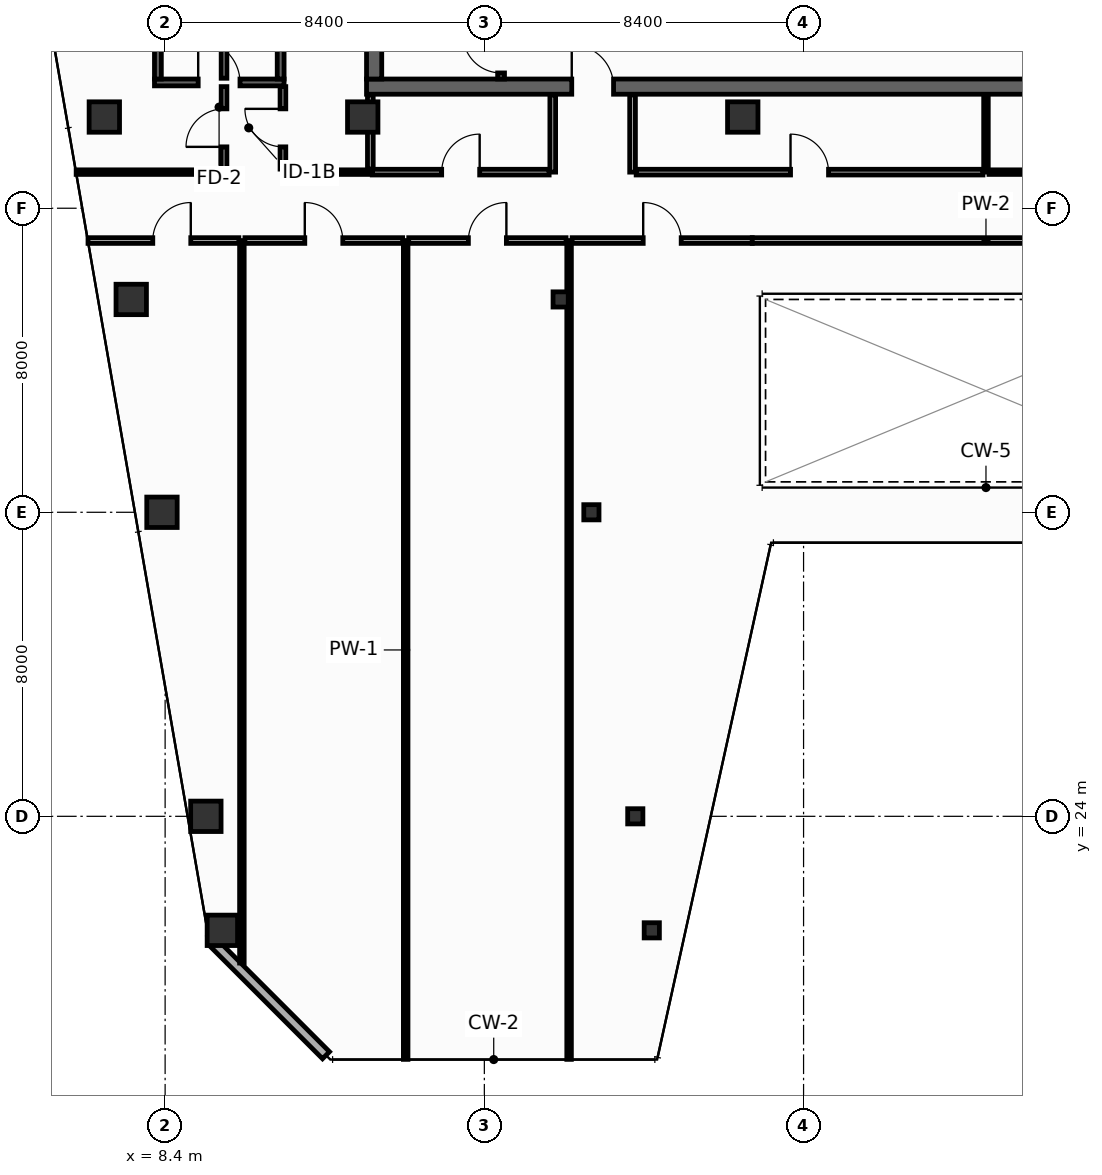
"""IFC4 building model, lengths in metres.
Left out: names, types, materials, properties, quantities, classifications, styles, units other than length and angle.
Written with IfcOpenShell. Run it as: python <this file> out.ifc"""

import sys

from ifc_helpers import new_model, si_unit, direction, frame, frame_2d, origin, origin_2d, place, context, subcontext, project, spatial, rectangle, hollow_rectangle, extrude, element, fill, save


model = new_model("IFC4")
c1 = context("Model", 3, precision=1e-05, world=origin(), true_north=direction((0.0, 1.0)))
c2 = subcontext(c1, "Body", "Model", "MODEL_VIEW")
j1 = project(units=[si_unit("LENGTHUNIT", "METRE"), si_unit("PLANEANGLEUNIT", "RADIAN")], contexts=[c1])
p1 = place(None, origin())
s1 = spatial("IfcSite", under=j1, at=p1, CompositionType="ELEMENT")
p2 = place(p1, origin())
s2 = spatial("IfcBuilding", under=s1, at=p2, CompositionType="ELEMENT")
p3 = place(p2, frame((0.0, 0.0, 234.4)))
s3 = spatial("IfcBuildingStorey", under=s2, at=p3, CompositionType="ELEMENT", Elevation=234.4)
p4 = place(p3, frame((13.7, 43.2, 0.0), z_axis=(0.0, 0.0, 1.0), x_axis=(1.0, 0.0, 0.0)))
e1 = element("IfcWall", 1, at=p4, inside=s3, PredefinedType="SHEAR", context=c2, shape_type="SweptSolid", body=[
    extrude(rectangle(XDim=32.5, YDim=0.4, at=frame_2d((16.25, 0.0))), origin(), (0.0, 0.0, 1.0), 3.55),
])
p5 = place(p4, frame((5.4, 0.0, 0.0)))
e2 = element("IfcOpeningElement", 2, at=p5, cuts=e1, PredefinedType="OPENING", context=c2, shape_type="SweptSolid", body=[
    extrude(rectangle(XDim=1.1, YDim=2.15, at=frame_2d((0.55, 1.075))), frame((0.0, 0.21, 0.0), z_axis=(0.0, -1.0, 0.0), x_axis=(1.0, 0.0, 0.0)), (0.0, 0.0, 1.0), 0.42),
])
p6 = place(p4, frame((25.6, 0.0, 0.0)))
e3 = element("IfcOpeningElement", 3, at=p6, cuts=e1, PredefinedType="OPENING", context=c2, shape_type="SweptSolid", body=[
    extrude(rectangle(XDim=1.1, YDim=2.15, at=frame_2d((0.55, 1.075))), frame((0.0, 0.21, 0.0), z_axis=(0.0, -1.0, 0.0), x_axis=(1.0, 0.0, 0.0)), (0.0, 0.0, 1.0), 0.42),
])
p7 = place(p3, frame((13.9, 43.4, 0.0), z_axis=(0.0, 0.0, 1.0), x_axis=(0.0, 1.0, 0.0)))
e4 = element("IfcWall", 4, at=p7, inside=s3, PredefinedType="SHEAR", context=c2, shape_type="SweptSolid", body=[
    extrude(rectangle(XDim=10.4, YDim=0.4, at=frame_2d((5.2, 0.0))), origin(), (0.0, 0.0, 1.0), 3.55),
])
for number, where, z_axis, x_axis in (
    (5, (6.8, 42.4, 0.0), (0.0, 0.0, 1.0), (1.0, 0.0, 0.0)),
    (6, (13.6, 42.4, 0.0), (0.0, 0.0, 1.0), (1.0, 0.0, 0.0)),
    (7, (23.6, 42.4, 0.0), (0.0, 0.0, 1.0), (1.0, 0.0, 0.0)),
    (8, (9.906, 21.0, 0.0), (0.0, 0.0, 1.0), (1.0, 0.0, 0.0)),
):
    element("IfcColumn", number, at=place(p3, frame(where, z_axis=z_axis, x_axis=x_axis)), inside=s3, PredefinedType="COLUMN", context=c2, shape_type="SweptSolid", body=[
        extrude(hollow_rectangle(XDim=0.8, YDim=0.8, WallThickness=0.036, at=origin_2d()), origin(), (0.0, 0.0, 1.0), 3.8),
    ])
p8 = place(p3, frame((21.206, 21.0, 0.0), z_axis=(0.0, 0.0, 1.0), x_axis=(1.0, 0.0, 0.0)))
e9 = element("IfcColumn", 9, at=p8, inside=s3, PredefinedType="COLUMN", context=c2, shape_type="SweptSolid", body=[
    extrude(hollow_rectangle(XDim=0.4, YDim=0.4, WallThickness=0.016, at=origin_2d()), origin(), (0.0, 0.0, 1.0), 3.8),
])
p9 = place(p3, frame((9.472, 24.0, 0.0), z_axis=(0.0, 0.0, 1.0), x_axis=(1.0, 0.0, 0.0)))
e10 = element("IfcColumn", 10, at=p9, inside=s3, PredefinedType="COLUMN", context=c2, shape_type="SweptSolid", body=[
    extrude(hollow_rectangle(XDim=0.8, YDim=0.8, WallThickness=0.036, at=origin_2d()), origin(), (0.0, 0.0, 1.0), 3.8),
])
p10 = place(p3, frame((20.772, 24.0, 0.0), z_axis=(0.0, 0.0, 1.0), x_axis=(1.0, 0.0, 0.0)))
e11 = element("IfcColumn", 11, at=p10, inside=s3, PredefinedType="COLUMN", context=c2, shape_type="SweptSolid", body=[
    extrude(hollow_rectangle(XDim=0.4, YDim=0.4, WallThickness=0.016, at=origin_2d()), origin(), (0.0, 0.0, 1.0), 3.8),
])
p11 = place(p3, frame((8.317, 32.0, 0.0), z_axis=(0.0, 0.0, 1.0), x_axis=(1.0, 0.0, 0.0)))
e12 = element("IfcColumn", 12, at=p11, inside=s3, PredefinedType="COLUMN", context=c2, shape_type="SweptSolid", body=[
    extrude(hollow_rectangle(XDim=0.8, YDim=0.8, WallThickness=0.036, at=origin_2d()), origin(), (0.0, 0.0, 1.0), 3.8),
])
p12 = place(p3, frame((19.617, 32.0, 0.0), z_axis=(0.0, 0.0, 1.0), x_axis=(1.0, 0.0, 0.0)))
e13 = element("IfcColumn", 13, at=p12, inside=s3, PredefinedType="COLUMN", context=c2, shape_type="SweptSolid", body=[
    extrude(hollow_rectangle(XDim=0.4, YDim=0.4, WallThickness=0.016, at=origin_2d()), origin(), (0.0, 0.0, 1.0), 3.8),
])
p13 = place(p3, frame((7.508, 37.6, 0.0), z_axis=(0.0, 0.0, 1.0), x_axis=(1.0, 0.0, 0.0)))
e14 = element("IfcColumn", 14, at=p13, inside=s3, PredefinedType="COLUMN", context=c2, shape_type="SweptSolid", body=[
    extrude(hollow_rectangle(XDim=0.8, YDim=0.8, WallThickness=0.036, at=origin_2d()), origin(), (0.0, 0.0, 1.0), 3.8),
])
p14 = place(p3, frame((18.808, 37.6, 0.0), z_axis=(0.0, 0.0, 1.0), x_axis=(1.0, 0.0, 0.0)))
e15 = element("IfcColumn", 15, at=p14, inside=s3, PredefinedType="COLUMN", context=c2, shape_type="SweptSolid", body=[
    extrude(hollow_rectangle(XDim=0.4, YDim=0.4, WallThickness=0.016, at=origin_2d()), origin(), (0.0, 0.0, 1.0), 3.8),
])
p15 = place(p3, frame((17.24, 43.4, 0.0), z_axis=(0.0, 0.0, 1.0), x_axis=(0.0, 1.0, 0.0)))
e16 = element("IfcWall", 16, at=p15, inside=s3, PredefinedType="SHEAR", context=c2, shape_type="SweptSolid", body=[
    extrude(rectangle(XDim=10.4, YDim=0.18, at=frame_2d((5.2, 0.0))), origin(), (0.0, 0.0, 1.0), 3.55),
])
p16 = place(p15, frame((0.16, 0.0, 0.0)))
e17 = element("IfcOpeningElement", 17, at=p16, cuts=e16, PredefinedType="OPENING", context=c2, shape_type="SweptSolid", body=[
    extrude(rectangle(XDim=1.0, YDim=2.15, at=frame_2d((0.5, 1.075))), frame((0.0, 0.1, 0.0), z_axis=(0.0, -1.0, 0.0), x_axis=(1.0, 0.0, 0.0)), (0.0, 0.0, 1.0), 0.2),
])
p17 = place(p3, frame((8.12, 43.31, 0.0), z_axis=(0.0, 0.0, 1.0), x_axis=(1.0, 0.0, 0.0)))
e18 = element("IfcWall", 18, at=p17, inside=s3, PredefinedType="SHEAR", context=c2, shape_type="SweptSolid", body=[
    extrude(rectangle(XDim=3.41, YDim=0.18, at=frame_2d((1.705, 0.0))), origin(), (0.0, 0.0, 1.0), 3.55),
])
p18 = place(p17, frame((1.15, 0.0, 0.0)))
e19 = element("IfcOpeningElement", 19, at=p18, cuts=e18, PredefinedType="OPENING", context=c2, shape_type="SweptSolid", body=[
    extrude(rectangle(XDim=1.1, YDim=2.15, at=frame_2d((0.55, 1.075))), frame((0.0, 0.1, 0.0), z_axis=(0.0, -1.0, 0.0), x_axis=(1.0, 0.0, 0.0)), (0.0, 0.0, 1.0), 0.2),
])
for number, where, z_axis, x_axis in (
    (20, (11.44, 43.4, 0.0), (0.0, 0.0, 1.0), (0.0, 1.0, 0.0)),
    (21, (8.21, 53.8, 0.0), (0.0, 0.0, 1.0), (0.0, -1.0, 0.0)),
):
    element("IfcWall", number, at=place(p3, frame(where, z_axis=z_axis, x_axis=x_axis)), inside=s3, PredefinedType="SHEAR", context=c2, shape_type="SweptSolid", body=[
        extrude(rectangle(XDim=10.4, YDim=0.18, at=frame_2d((5.2, 0.0))), origin(), (0.0, 0.0, 1.0), 3.55),
    ])
p19 = place(p3, frame((9.66, 20.687, 0.0), z_axis=(0.0, 0.0, 1.0), x_axis=(0.70707775441, -0.707135806771, 0.0)))
e22 = element("IfcWall", 22, at=p19, inside=s3, PredefinedType="STANDARD", context=c2, shape_type="SweptSolid", body=[
    extrude(rectangle(XDim=4.206, YDim=0.26, at=frame_2d((2.103, 0.0))), origin(), (0.0, 0.0, 1.0), 3.55),
])
p20 = place(p3, frame((6.059, 40.95, 0.0), z_axis=(0.0, 0.0, 1.0), x_axis=(1.0, 0.0, 0.0)))
e23 = element("IfcWall", 23, at=p20, inside=s3, PredefinedType="PARTITIONING", context=c2, shape_type="SweptSolid", body=[
    extrude(rectangle(XDim=3.891, YDim=0.12, at=frame_2d((1.945, 0.0))), origin(), (0.0, 0.0, 1.0), 3.085),
])
p21 = place(p3, frame((11.5, 40.95, 0.0), z_axis=(0.0, 0.0, 1.0), x_axis=(1.0, 0.0, 0.0)))
e24 = element("IfcWall", 24, at=p21, inside=s3, PredefinedType="PARTITIONING", context=c2, shape_type="SweptSolid", body=[
    extrude(rectangle(XDim=2.35, YDim=0.12, at=frame_2d((1.175, 0.0))), origin(), (0.0, 0.0, 1.0), 3.55),
])
p22 = place(p3, frame((9.95, 41.03, 0.0), z_axis=(0.0, 0.0, 1.0), x_axis=(0.0, 1.0, 0.0)))
e25 = element("IfcWall", 25, at=p22, inside=s3, PredefinedType="PARTITIONING", context=c2, shape_type="SweptSolid", body=[
    extrude(rectangle(XDim=2.17, YDim=0.15, at=frame_2d((1.085, 0.0))), origin(), (0.0, 0.0, 1.0), 2.947),
])
p23 = place(p22, frame((0.585, 0.0, 0.0)))
e26 = element("IfcOpeningElement", 26, at=p23, cuts=e25, PredefinedType="OPENING", context=c2, shape_type="SweptSolid", body=[
    extrude(rectangle(XDim=1.0, YDim=2.15, at=frame_2d((0.5, 1.075))), frame((0.0, 0.085, 0.0), z_axis=(0.0, -1.0, 0.0), x_axis=(1.0, 0.0, 0.0)), (0.0, 0.0, 1.0), 0.17),
])
p24 = place(p3, frame((9.95, 43.42, 0.0), z_axis=(0.0, 0.0, 1.0), x_axis=(0.0, 1.0, 0.0)))
e27 = element("IfcWall", 27, at=p24, inside=s3, PredefinedType="PARTITIONING", context=c2, shape_type="SweptSolid", body=[
    extrude(rectangle(XDim=1.45, YDim=0.15, at=frame_2d((0.725, 0.0))), origin(), (0.0, 0.0, 1.0), 3.55),
])
p25 = place(p3, frame((11.5, 41.03, 0.0), z_axis=(0.0, 0.0, 1.0), x_axis=(0.0, 1.0, 0.0)))
e28 = element("IfcWall", 28, at=p25, inside=s3, PredefinedType="PARTITIONING", context=c2, shape_type="SweptSolid", body=[
    extrude(rectangle(XDim=2.17, YDim=0.15, at=frame_2d((1.085, 0.0))), origin(), (0.0, 0.0, 1.0), 2.947),
])
p26 = place(p25, frame((0.585, 0.0, 0.0)))
e29 = element("IfcOpeningElement", 29, at=p26, cuts=e28, PredefinedType="OPENING", context=c2, shape_type="SweptSolid", body=[
    extrude(rectangle(XDim=1.0, YDim=2.15, at=frame_2d((0.5, 1.075))), frame((0.0, 0.085, 0.0), z_axis=(0.0, -1.0, 0.0), x_axis=(1.0, 0.0, 0.0)), (0.0, 0.0, 1.0), 0.17),
])
p27 = place(p3, frame((13.8, 41.03, 0.0), z_axis=(0.0, 0.0, 1.0), x_axis=(0.0, 1.0, 0.0)))
e30 = element("IfcWall", 30, at=p27, inside=s3, PredefinedType="PARTITIONING", context=c2, shape_type="SweptSolid", body=[
    extrude(rectangle(XDim=1.95, YDim=0.15, at=frame_2d((0.975, 0.0))), origin(), (0.0, 0.0, 1.0), 3.55),
])
for number, where, z_axis, x_axis in (
    (31, (18.6, 40.95, 0.0), (0.0, 0.0, 1.0), (0.0, 1.0, 0.0)),
    (32, (20.7, 40.95, 0.0), (0.0, 0.0, 1.0), (0.0, 1.0, 0.0)),
):
    element("IfcWall", number, at=place(p3, frame(where, z_axis=z_axis, x_axis=x_axis)), inside=s3, PredefinedType="PARTITIONING", context=c2, shape_type="SweptSolid", body=[
        extrude(rectangle(XDim=2.03, YDim=0.15, at=frame_2d((1.015, 0.0))), origin(), (0.0, 0.0, 1.0), 3.55),
    ])
p28 = place(p3, frame((13.85, 40.95, 0.0), z_axis=(0.0, 0.0, 1.0), x_axis=(1.0, 0.0, 0.0)))
e33 = element("IfcWall", 33, at=p28, inside=s3, PredefinedType="PARTITIONING", context=c2, shape_type="SweptSolid", body=[
    extrude(rectangle(XDim=4.655, YDim=0.15, at=frame_2d((2.327, 0.0))), origin(), (0.0, 0.0, 1.0), 3.55),
])
p29 = place(p28, frame((1.827, 0.0, 0.0)))
e34 = element("IfcOpeningElement", 34, at=p29, cuts=e33, PredefinedType="OPENING", context=c2, shape_type="SweptSolid", body=[
    extrude(rectangle(XDim=1.0, YDim=2.15, at=frame_2d((0.5, 1.075))), frame((0.0, 0.085, 0.0), z_axis=(0.0, -1.0, 0.0), x_axis=(1.0, 0.0, 0.0)), (0.0, 0.0, 1.0), 0.17),
])
p30 = place(p3, frame((30.0, 40.95, 0.0), z_axis=(0.0, 0.0, 1.0), x_axis=(0.0, 1.0, 0.0)))
e35 = element("IfcWall", 35, at=p30, inside=s3, PredefinedType="PARTITIONING", context=c2, shape_type="SweptSolid", body=[
    extrude(rectangle(XDim=2.03, YDim=0.12, at=frame_2d((1.015, 0.0))), origin(), (0.0, 0.0, 1.0), 2.947),
])
p31 = place(p3, frame((20.795, 40.95, 0.0), z_axis=(0.0, 0.0, 1.0), x_axis=(1.0, 0.0, 0.0)))
e36 = element("IfcWall", 36, at=p31, inside=s3, PredefinedType="PARTITIONING", context=c2, shape_type="SweptSolid", body=[
    extrude(rectangle(XDim=9.125, YDim=0.15, at=frame_2d((4.562, 0.0))), origin(), (0.0, 0.0, 1.0), 2.947),
])
p32 = place(p31, frame((4.062, 0.0, 0.0)))
e37 = element("IfcOpeningElement", 37, at=p32, cuts=e36, PredefinedType="OPENING", context=c2, shape_type="SweptSolid", body=[
    extrude(rectangle(XDim=1.0, YDim=2.15, at=frame_2d((0.5, 1.075))), frame((0.0, 0.085, 0.0), z_axis=(0.0, -1.0, 0.0), x_axis=(1.0, 0.0, 0.0)), (0.0, 0.0, 1.0), 0.17),
])
p33 = place(p3, frame((30.08, 40.95, 0.0), z_axis=(0.0, 0.0, 1.0), x_axis=(1.0, 0.0, 0.0)))
e38 = element("IfcWall", 38, at=p33, inside=s3, PredefinedType="PARTITIONING", context=c2, shape_type="SweptSolid", body=[
    extrude(rectangle(XDim=8.625, YDim=0.12, at=frame_2d((4.312, 0.0))), origin(), (0.0, 0.0, 1.0), 2.947),
])
p34 = place(p33, frame((3.862, 0.0, 0.0)))
e39 = element("IfcOpeningElement", 39, at=p34, cuts=e38, PredefinedType="OPENING", context=c2, shape_type="SweptSolid", body=[
    extrude(rectangle(XDim=0.9, YDim=2.1, at=frame_2d((0.45, 1.05))), frame((0.0, 0.07, 0.0), z_axis=(0.0, -1.0, 0.0), x_axis=(1.0, 0.0, 0.0)), (0.0, 0.0, 1.0), 0.14),
])
p35 = place(p3, frame((10.42, 20.139, 0.0), z_axis=(0.0, 0.0, 1.0), x_axis=(0.0, 1.0, 0.0)))
e40 = element("IfcWall", 40, at=p35, inside=s3, PredefinedType="PARTITIONING", context=c2, shape_type="SweptSolid", body=[
    extrude(rectangle(XDim=19.011, YDim=0.12, at=frame_2d((9.505, 0.0))), origin(), (0.0, 0.0, 1.0), 2.947),
])
for number, where, z_axis, x_axis in (
    (41, (14.73, 17.605, 0.0), (0.0, 0.0, 1.0), (0.0, 1.0, 0.0)),
    (42, (19.03, 17.605, 0.0), (0.0, 0.0, 1.0), (0.0, 1.0, 0.0)),
):
    element("IfcWall", number, at=place(p3, frame(where, z_axis=z_axis, x_axis=x_axis)), inside=s3, PredefinedType="PARTITIONING", context=c2, shape_type="SweptSolid", body=[
        extrude(rectangle(XDim=21.545, YDim=0.12, at=frame_2d((10.772, 0.0))), origin(), (0.0, 0.0, 1.0), 2.947),
    ])
p36 = place(p3, frame((6.371, 39.15, 0.0), z_axis=(0.0, 0.0, 1.0), x_axis=(1.0, 0.0, 0.0)))
e43 = element("IfcWall", 43, at=p36, inside=s3, PredefinedType="PARTITIONING", context=c2, shape_type="SweptSolid", body=[
    extrude(rectangle(XDim=3.969, YDim=0.15, at=frame_2d((1.984, 0.0))), origin(), (0.0, 0.0, 1.0), 3.085),
])
p37 = place(p36, frame((1.704, 0.0, 0.0)))
e44 = element("IfcOpeningElement", 44, at=p37, cuts=e43, PredefinedType="OPENING", context=c2, shape_type="SweptSolid", body=[
    extrude(rectangle(XDim=1.0, YDim=2.15, at=frame_2d((0.5, 1.075))), frame((0.0, 0.085, 0.0), z_axis=(0.0, -1.0, 0.0), x_axis=(1.0, 0.0, 0.0)), (0.0, 0.0, 1.0), 0.17),
])
p38 = place(p3, frame((10.5, 39.15, 0.0), z_axis=(0.0, 0.0, 1.0), x_axis=(1.0, 0.0, 0.0)))
e45 = element("IfcWall", 45, at=p38, inside=s3, PredefinedType="PARTITIONING", context=c2, shape_type="SweptSolid", body=[
    extrude(rectangle(XDim=4.15, YDim=0.15, at=frame_2d((2.075, 0.0))), origin(), (0.0, 0.0, 1.0), 3.55),
])
p39 = place(p38, frame((1.575, 0.0, 0.0)))
e46 = element("IfcOpeningElement", 46, at=p39, cuts=e45, PredefinedType="OPENING", context=c2, shape_type="SweptSolid", body=[
    extrude(rectangle(XDim=1.0, YDim=2.15, at=frame_2d((0.5, 1.075))), frame((0.0, 0.085, 0.0), z_axis=(0.0, -1.0, 0.0), x_axis=(1.0, 0.0, 0.0)), (0.0, 0.0, 1.0), 0.17),
])
p40 = place(p3, frame((14.81, 39.15, 0.0), z_axis=(0.0, 0.0, 1.0), x_axis=(1.0, 0.0, 0.0)))
e47 = element("IfcWall", 47, at=p40, inside=s3, PredefinedType="PARTITIONING", context=c2, shape_type="SweptSolid", body=[
    extrude(rectangle(XDim=4.14, YDim=0.15, at=frame_2d((2.07, 0.0))), origin(), (0.0, 0.0, 1.0), 3.55),
])
p41 = place(p40, frame((1.57, 0.0, 0.0)))
e48 = element("IfcOpeningElement", 48, at=p41, cuts=e47, PredefinedType="OPENING", context=c2, shape_type="SweptSolid", body=[
    extrude(rectangle(XDim=1.0, YDim=2.15, at=frame_2d((0.5, 1.075))), frame((0.0, 0.085, 0.0), z_axis=(0.0, -1.0, 0.0), x_axis=(1.0, 0.0, 0.0)), (0.0, 0.0, 1.0), 0.17),
])
p42 = place(p3, frame((19.11, 39.15, 0.0), z_axis=(0.0, 0.0, 1.0), x_axis=(1.0, 0.0, 0.0)))
e49 = element("IfcWall", 49, at=p42, inside=s3, PredefinedType="PARTITIONING", context=c2, shape_type="SweptSolid", body=[
    extrude(rectangle(XDim=4.74, YDim=0.15, at=frame_2d((2.37, 0.0))), origin(), (0.0, 0.0, 1.0), 2.947),
])
p43 = place(p42, frame((1.87, 0.0, 0.0)))
e50 = element("IfcOpeningElement", 50, at=p43, cuts=e49, PredefinedType="OPENING", context=c2, shape_type="SweptSolid", body=[
    extrude(rectangle(XDim=1.0, YDim=2.15, at=frame_2d((0.5, 1.075))), frame((0.0, 0.085, 0.0), z_axis=(0.0, -1.0, 0.0), x_axis=(1.0, 0.0, 0.0)), (0.0, 0.0, 1.0), 0.17),
])
p44 = place(p3, frame((23.85, 39.15, 0.0), z_axis=(0.0, 0.0, 1.0), x_axis=(1.0, 0.0, 0.0)))
e51 = element("IfcWall", 51, at=p44, inside=s3, PredefinedType="PARTITIONING", context=c2, shape_type="SweptSolid", body=[
    extrude(rectangle(XDim=12.3, YDim=0.15, at=frame_2d((6.15, 0.0))), origin(), (0.0, 0.0, 1.0), 3.55),
])
p45 = place(p16, origin())
e52 = element("IfcDoor", 52, at=p45, inside=s3, OperationType="SINGLE_SWING_RIGHT", PredefinedType="DOOR", context=c2, shape_type="SweptSolid", body=[
    extrude(rectangle(XDim=1.0, YDim=2.15, at=frame_2d((0.5, 1.075))), frame((0.0, 0.025, 0.0), z_axis=(0.0, -1.0, 0.0), x_axis=(1.0, 0.0, 0.0)), (0.0, 0.0, 1.0), 0.05),
])
fill(e17, e52)
p46 = place(p18, origin())
e53 = element("IfcDoor", 53, at=p46, inside=s3, OperationType="SINGLE_SWING_LEFT", PredefinedType="DOOR", context=c2, shape_type="SweptSolid", body=[
    extrude(rectangle(XDim=1.1, YDim=2.15, at=frame_2d((0.55, 1.075))), frame((0.0, 0.025, 0.0), z_axis=(0.0, -1.0, 0.0), x_axis=(1.0, 0.0, 0.0)), (0.0, 0.0, 1.0), 0.05),
])
fill(e19, e53)
p47 = place(p5, origin())
e54 = element("IfcDoor", 54, at=p47, inside=s3, OperationType="SINGLE_SWING_LEFT", PredefinedType="DOOR", context=c2, shape_type="SweptSolid", body=[
    extrude(rectangle(XDim=1.1, YDim=2.15, at=frame_2d((0.55, 1.075))), frame((0.0, 0.025, 0.0), z_axis=(0.0, -1.0, 0.0), x_axis=(1.0, 0.0, 0.0)), (0.0, 0.0, 1.0), 0.05),
])
fill(e2, e54)
p48 = place(p23, origin())
e55 = element("IfcDoor", 55, at=p48, inside=s3, OperationType="SINGLE_SWING_LEFT", PredefinedType="DOOR", context=c2, shape_type="SweptSolid", body=[
    extrude(rectangle(XDim=1.0, YDim=2.15, at=frame_2d((0.5, 1.075))), frame((0.0, 0.025, 0.0), z_axis=(0.0, -1.0, 0.0), x_axis=(1.0, 0.0, 0.0)), (0.0, 0.0, 1.0), 0.05),
])
fill(e26, e55)
p49 = place(p26, origin())
e56 = element("IfcDoor", 56, at=p49, inside=s3, OperationType="SINGLE_SWING_RIGHT", PredefinedType="DOOR", context=c2, shape_type="SweptSolid", body=[
    extrude(rectangle(XDim=1.0, YDim=2.15, at=frame_2d((0.5, 1.075))), frame((0.0, 0.025, 0.0), z_axis=(0.0, -1.0, 0.0), x_axis=(1.0, 0.0, 0.0)), (0.0, 0.0, 1.0), 0.05),
])
fill(e29, e56)
p50 = place(p29, origin())
e57 = element("IfcDoor", 57, at=p50, inside=s3, OperationType="SINGLE_SWING_RIGHT", PredefinedType="DOOR", context=c2, shape_type="SweptSolid", body=[
    extrude(rectangle(XDim=1.0, YDim=2.15, at=frame_2d((0.5, 1.075))), frame((0.0, 0.025, 0.0), z_axis=(0.0, -1.0, 0.0), x_axis=(1.0, 0.0, 0.0)), (0.0, 0.0, 1.0), 0.05),
])
fill(e34, e57)
p51 = place(p32, origin())
e58 = element("IfcDoor", 58, at=p51, inside=s3, OperationType="SINGLE_SWING_LEFT", PredefinedType="DOOR", context=c2, shape_type="SweptSolid", body=[
    extrude(rectangle(XDim=1.0, YDim=2.15, at=frame_2d((0.5, 1.075))), frame((0.0, 0.025, 0.0), z_axis=(0.0, -1.0, 0.0), x_axis=(1.0, 0.0, 0.0)), (0.0, 0.0, 1.0), 0.05),
])
fill(e37, e58)
p52 = place(p37, origin())
e59 = element("IfcDoor", 59, at=p52, inside=s3, OperationType="SINGLE_SWING_RIGHT", PredefinedType="DOOR", context=c2, shape_type="SweptSolid", body=[
    extrude(rectangle(XDim=1.0, YDim=2.15, at=frame_2d((0.5, 1.075))), frame((0.0, 0.025, 0.0), z_axis=(0.0, -1.0, 0.0), x_axis=(1.0, 0.0, 0.0)), (0.0, 0.0, 1.0), 0.05),
])
fill(e44, e59)
p53 = place(p39, origin())
e60 = element("IfcDoor", 60, at=p53, inside=s3, OperationType="SINGLE_SWING_LEFT", PredefinedType="DOOR", context=c2, shape_type="SweptSolid", body=[
    extrude(rectangle(XDim=1.0, YDim=2.15, at=frame_2d((0.5, 1.075))), frame((0.0, 0.025, 0.0), z_axis=(0.0, -1.0, 0.0), x_axis=(1.0, 0.0, 0.0)), (0.0, 0.0, 1.0), 0.05),
])
fill(e46, e60)
p54 = place(p41, origin())
e61 = element("IfcDoor", 61, at=p54, inside=s3, OperationType="SINGLE_SWING_RIGHT", PredefinedType="DOOR", context=c2, shape_type="SweptSolid", body=[
    extrude(rectangle(XDim=1.0, YDim=2.15, at=frame_2d((0.5, 1.075))), frame((0.0, 0.025, 0.0), z_axis=(0.0, -1.0, 0.0), x_axis=(1.0, 0.0, 0.0)), (0.0, 0.0, 1.0), 0.05),
])
fill(e48, e61)
p55 = place(p43, origin())
e62 = element("IfcDoor", 62, at=p55, inside=s3, OperationType="SINGLE_SWING_LEFT", PredefinedType="DOOR", context=c2, shape_type="SweptSolid", body=[
    extrude(rectangle(XDim=1.0, YDim=2.15, at=frame_2d((0.5, 1.075))), frame((0.0, 0.025, 0.0), z_axis=(0.0, -1.0, 0.0), x_axis=(1.0, 0.0, 0.0)), (0.0, 0.0, 1.0), 0.05),
])
fill(e50, e62)
save(model, sys.argv[1])
